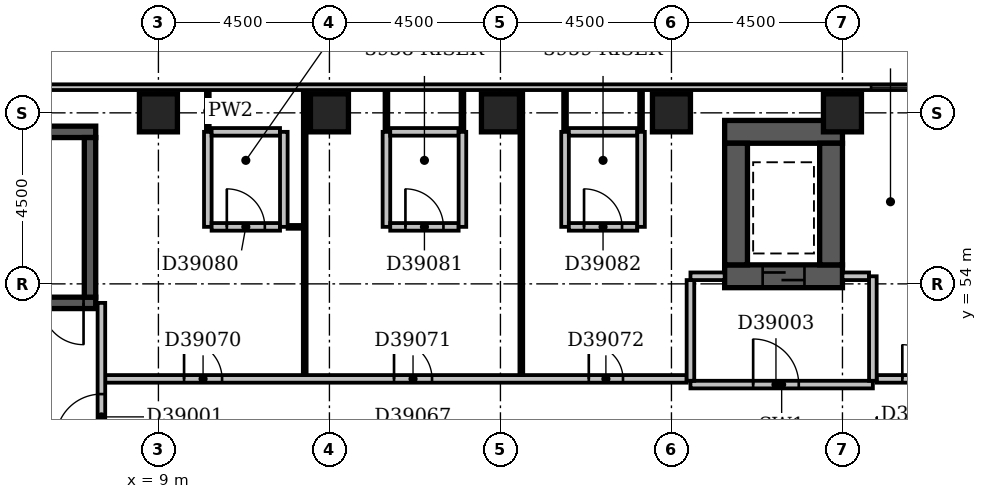
"""IFC4 building model, lengths in metres.
Left out: names, types, materials, properties, quantities, classifications, styles, units other than length and angle.
Written with IfcOpenShell. Run it as: python <this file> out.ifc"""

import sys

from ifc_helpers import new_model, si_unit, direction, frame, frame_2d, origin, origin_2d, place, context, subcontext, project, spatial, rectangle, extrude, element, fill, save


model = new_model("IFC4")
c1 = context("Model", 3, precision=1e-05, world=origin(), true_north=direction((0.0, 1.0)))
c2 = subcontext(c1, "Body", "Model", "MODEL_VIEW")
j1 = project(units=[si_unit("LENGTHUNIT", "METRE"), si_unit("PLANEANGLEUNIT", "RADIAN")], contexts=[c1])
p1 = place(None, origin())
s1 = spatial("IfcSite", under=j1, at=p1, CompositionType="ELEMENT")
p2 = place(p1, origin())
s2 = spatial("IfcBuilding", under=s1, at=p2, CompositionType="ELEMENT")
p3 = place(p2, frame((0.0, 0.0, 155.6)))
s3 = spatial("IfcBuildingStorey", under=s2, at=p3, CompositionType="ELEMENT", Elevation=155.6)
p4 = place(p3, frame((0.35, 53.5, -0.3), z_axis=(0.0, 0.0, 1.0), x_axis=(1.0, 0.0, 0.0)))
e1 = element("IfcWall", 1, at=p4, inside=s3, PredefinedType="SHEAR", context=c2, shape_type="SweptSolid", body=[
    extrude(rectangle(XDim=7.0, YDim=0.3, at=frame_2d((3.5, 0.0))), origin(), (0.0, 0.0, 1.0), 3.6),
])
p5 = place(p4, frame((5.58, 0.0, 0.3)))
e2 = element("IfcOpeningElement", 2, at=p5, cuts=e1, PredefinedType="OPENING", context=c2, shape_type="SweptSolid", body=[
    extrude(rectangle(XDim=1.1, YDim=2.1, at=frame_2d((0.55, 1.05))), frame((0.0, 0.162, 0.0), z_axis=(0.0, -1.0, 0.0), x_axis=(1.0, 0.0, 0.0)), (0.0, 0.0, 1.0), 0.324),
])
p6 = place(p3, frame((0.35, 58.0, -0.3), z_axis=(0.0, 0.0, 1.0), x_axis=(1.0, 0.0, 0.0)))
e3 = element("IfcWall", 3, at=p6, inside=s3, PredefinedType="SHEAR", context=c2, shape_type="SweptSolid", body=[
    extrude(rectangle(XDim=7.0, YDim=0.3, at=frame_2d((3.5, 0.0))), origin(), (0.0, 0.0, 1.0), 3.6),
])
p7 = place(p3, frame((7.2, 53.65, -0.3), z_axis=(0.0, 0.0, 1.0), x_axis=(0.0, 1.0, 0.0)))
e4 = element("IfcWall", 4, at=p7, inside=s3, PredefinedType="SHEAR", context=c2, shape_type="SweptSolid", body=[
    extrude(rectangle(XDim=4.2, YDim=0.3, at=frame_2d((2.1, 0.0))), origin(), (0.0, 0.0, 1.0), 3.6),
])
p8 = place(p3, frame((23.9, 54.2, -0.3), z_axis=(0.0, 0.0, 1.0), x_axis=(1.0, 0.0, 0.0)))
e5 = element("IfcWall", 5, at=p8, inside=s3, PredefinedType="SHEAR", context=c2, shape_type="SweptSolid", body=[
    extrude(rectangle(XDim=3.1, YDim=0.6, at=frame_2d((1.55, 0.0))), origin(), (0.0, 0.0, 1.0), 3.6),
])
p9 = place(p8, frame((1.0, 0.0, 0.3)))
e6 = element("IfcOpeningElement", 6, at=p9, cuts=e5, PredefinedType="OPENING", context=c2, shape_type="SweptSolid", body=[
    extrude(rectangle(XDim=1.1, YDim=2.1, at=frame_2d((0.55, 1.05))), frame((0.0, 0.312, 0.0), z_axis=(0.0, -1.0, 0.0), x_axis=(1.0, 0.0, 0.0)), (0.0, 0.0, 1.0), 0.624),
])
p10 = place(p3, frame((23.9, 58.0, -0.3), z_axis=(0.0, 0.0, 1.0), x_axis=(1.0, 0.0, 0.0)))
e7 = element("IfcWall", 7, at=p10, inside=s3, PredefinedType="SHEAR", context=c2, shape_type="SweptSolid", body=[
    extrude(rectangle(XDim=3.1, YDim=0.6, at=frame_2d((1.55, 0.0))), origin(), (0.0, 0.0, 1.0), 3.6),
])
for number, where, z_axis, x_axis in (
    (8, (24.2, 54.5, -0.3), (0.0, 0.0, 1.0), (0.0, 1.0, 0.0)),
    (9, (26.7, 54.5, -0.3), (0.0, 0.0, 1.0), (0.0, 1.0, 0.0)),
):
    element("IfcWall", number, at=place(p3, frame(where, z_axis=z_axis, x_axis=x_axis)), inside=s3, PredefinedType="SHEAR", context=c2, shape_type="SweptSolid", body=[
        extrude(rectangle(XDim=3.2, YDim=0.6, at=frame_2d((1.6, 0.0))), origin(), (0.0, 0.0, 1.0), 3.6),
    ])
for number, where, z_axis, x_axis in (
    (10, (9.0, 58.5, -0.3), (0.0, 0.0, 1.0), (1.0, 0.0, 0.0)),
    (11, (13.5, 58.5, -0.3), (0.0, 0.0, 1.0), (1.0, 0.0, 0.0)),
    (12, (18.0, 58.5, -0.3), (0.0, 0.0, 1.0), (1.0, 0.0, 0.0)),
    (13, (22.5, 58.5, -0.3), (0.0, 0.0, 1.0), (1.0, 0.0, 0.0)),
    (14, (27.0, 58.5, -0.3), (0.0, 0.0, 1.0), (1.0, 0.0, 0.0)),
):
    element("IfcColumn", number, at=place(p3, frame(where, z_axis=z_axis, x_axis=x_axis)), inside=s3, PredefinedType="COLUMN", context=c2, shape_type="SweptSolid", body=[
        extrude(rectangle(XDim=1.0, YDim=1.0, at=origin_2d()), origin(), (0.0, 0.0, 1.0), 3.6),
    ])
p11 = place(p3, frame((68.1, 59.175, 0.0), z_axis=(0.0, 0.0, 1.0), x_axis=(-1.0, 0.0, 0.0)))
e15 = element("IfcWall", 15, at=p11, inside=s3, PredefinedType="STANDARD", context=c2, shape_type="SweptSolid", body=[
    extrude(rectangle(XDim=68.85, YDim=0.15, at=frame_2d((34.425, 0.0))), origin(), (0.0, 0.0, 1.0), 2.7),
])
p12 = place(p11, frame((1.65, 0.0, 0.6)))
e16 = element("IfcOpeningElement", 16, at=p12, cuts=e15, PredefinedType="OPENING", context=c2, shape_type="SweptSolid", body=[
    extrude(rectangle(XDim=2.4, YDim=1.8, at=frame_2d((1.2, 0.9))), frame((0.0, 0.087, 0.0), z_axis=(0.0, -1.0, 0.0), x_axis=(1.0, 0.0, 0.0)), (0.0, 0.0, 1.0), 0.174),
])
p13 = place(p11, frame((6.15, 0.0, 0.6)))
e17 = element("IfcOpeningElement", 17, at=p13, cuts=e15, PredefinedType="OPENING", context=c2, shape_type="SweptSolid", body=[
    extrude(rectangle(XDim=2.4, YDim=1.8, at=frame_2d((1.2, 0.9))), frame((0.0, 0.087, 0.0), z_axis=(0.0, -1.0, 0.0), x_axis=(1.0, 0.0, 0.0)), (0.0, 0.0, 1.0), 0.174),
])
p14 = place(p11, frame((38.847, 0.0, 0.6)))
e18 = element("IfcOpeningElement", 18, at=p14, cuts=e15, PredefinedType="OPENING", context=c2, shape_type="SweptSolid", body=[
    extrude(rectangle(XDim=1.5, YDim=1.8, at=frame_2d((0.75, 0.9))), frame((0.0, 0.087, 0.0), z_axis=(0.0, -1.0, 0.0), x_axis=(1.0, 0.0, 0.0)), (0.0, 0.0, 1.0), 0.174),
])
p15 = place(p3, frame((23.0, 51.35, 0.0), z_axis=(0.0, 0.0, 1.0), x_axis=(1.0, 0.0, 0.0)))
e19 = element("IfcWall", 19, at=p15, inside=s3, PredefinedType="PARTITIONING", context=c2, shape_type="SweptSolid", body=[
    extrude(rectangle(XDim=4.8, YDim=0.2, at=frame_2d((2.4, 0.0))), origin(), (0.0, 0.0, 1.0), 3.3),
])
p16 = place(p15, frame((1.65, 0.0, 0.0)))
e20 = element("IfcOpeningElement", 20, at=p16, cuts=e19, PredefinedType="OPENING", context=c2, shape_type="SweptSolid", body=[
    extrude(rectangle(XDim=1.2, YDim=2.1, at=frame_2d((0.6, 1.05))), frame((0.0, 0.112, 0.0), z_axis=(0.0, -1.0, 0.0), x_axis=(1.0, 0.0, 0.0)), (0.0, 0.0, 1.0), 0.224),
])
p17 = place(p3, frame((27.8, 51.45, 0.0), z_axis=(0.0, 0.0, 1.0), x_axis=(0.0, 1.0, 0.0)))
e21 = element("IfcWall", 21, at=p17, inside=s3, PredefinedType="PARTITIONING", context=c2, shape_type="SweptSolid", body=[
    extrude(rectangle(XDim=2.75, YDim=0.2, at=frame_2d((1.375, 0.0))), origin(), (0.0, 0.0, 1.0), 3.3),
])
p18 = place(p3, frame((23.0, 54.2, 0.0), z_axis=(0.0, 0.0, 1.0), x_axis=(1.0, 0.0, 0.0)))
e22 = element("IfcWall", 22, at=p18, inside=s3, PredefinedType="PARTITIONING", context=c2, shape_type="SweptSolid", body=[
    extrude(rectangle(XDim=0.9, YDim=0.2, at=frame_2d((0.45, 0.0))), origin(), (0.0, 0.0, 1.0), 3.3),
])
p19 = place(p3, frame((27.0, 54.2, 0.0), z_axis=(0.0, 0.0, 1.0), x_axis=(1.0, 0.0, 0.0)))
e23 = element("IfcWall", 23, at=p19, inside=s3, PredefinedType="PARTITIONING", context=c2, shape_type="SweptSolid", body=[
    extrude(rectangle(XDim=0.7, YDim=0.2, at=frame_2d((0.35, 0.0))), origin(), (0.0, 0.0, 1.0), 3.3),
])
p20 = place(p3, frame((23.0, 51.45, 0.0), z_axis=(0.0, 0.0, 1.0), x_axis=(0.0, 1.0, 0.0)))
e24 = element("IfcWall", 24, at=p20, inside=s3, PredefinedType="PARTITIONING", context=c2, shape_type="SweptSolid", body=[
    extrude(rectangle(XDim=2.65, YDim=0.2, at=frame_2d((1.325, 0.0))), origin(), (0.0, 0.0, 1.0), 3.3),
])
p21 = place(p3, frame((7.5, 49.6, 0.0), z_axis=(0.0, 0.0, 1.0), x_axis=(0.0, 1.0, 0.0)))
e25 = element("IfcWall", 25, at=p21, inside=s3, PredefinedType="PARTITIONING", context=c2, shape_type="SweptSolid", body=[
    extrude(rectangle(XDim=3.9, YDim=0.2, at=frame_2d((1.95, 0.0))), origin(), (0.0, 0.0, 1.0), 3.3),
])
p22 = place(p21, frame((0.3, 0.0, 0.0)))
e26 = element("IfcOpeningElement", 26, at=p22, cuts=e25, PredefinedType="OPENING", context=c2, shape_type="SweptSolid", body=[
    extrude(rectangle(XDim=1.2, YDim=2.1, at=frame_2d((0.6, 1.05))), frame((0.0, 0.112, 0.0), z_axis=(0.0, -1.0, 0.0), x_axis=(1.0, 0.0, 0.0)), (0.0, 0.0, 1.0), 0.224),
])
p23 = place(p3, frame((7.6, 51.5, 0.0), z_axis=(0.0, 0.0, 1.0), x_axis=(1.0, 0.0, 0.0)))
e27 = element("IfcWall", 27, at=p23, inside=s3, PredefinedType="PARTITIONING", context=c2, shape_type="SweptSolid", body=[
    extrude(rectangle(XDim=15.3, YDim=0.2, at=frame_2d((7.65, 0.0))), origin(), (0.0, 0.0, 1.0), 3.3),
])
p24 = place(p23, frame((2.075, 0.0, 0.0)))
e28 = element("IfcOpeningElement", 28, at=p24, cuts=e27, PredefinedType="OPENING", context=c2, shape_type="SweptSolid", body=[
    extrude(rectangle(XDim=1.0, YDim=2.1, at=frame_2d((0.5, 1.05))), frame((0.0, 0.112, 0.0), z_axis=(0.0, -1.0, 0.0), x_axis=(1.0, 0.0, 0.0)), (0.0, 0.0, 1.0), 0.224),
])
p25 = place(p23, frame((7.6, 0.0, 0.0)))
e29 = element("IfcOpeningElement", 29, at=p25, cuts=e27, PredefinedType="OPENING", context=c2, shape_type="SweptSolid", body=[
    extrude(rectangle(XDim=1.0, YDim=2.1, at=frame_2d((0.5, 1.05))), frame((0.0, 0.112, 0.0), z_axis=(0.0, -1.0, 0.0), x_axis=(1.0, 0.0, 0.0)), (0.0, 0.0, 1.0), 0.224),
])
p26 = place(p23, frame((12.725, 0.0, 0.0)))
e30 = element("IfcOpeningElement", 30, at=p26, cuts=e27, PredefinedType="OPENING", context=c2, shape_type="SweptSolid", body=[
    extrude(rectangle(XDim=0.9, YDim=2.1, at=frame_2d((0.45, 1.05))), frame((0.0, 0.112, 0.0), z_axis=(0.0, -1.0, 0.0), x_axis=(1.0, 0.0, 0.0)), (0.0, 0.0, 1.0), 0.224),
])
p27 = place(p3, frame((27.9, 51.5, 0.0), z_axis=(0.0, 0.0, 1.0), x_axis=(1.0, 0.0, 0.0)))
e31 = element("IfcWall", 31, at=p27, inside=s3, PredefinedType="PARTITIONING", context=c2, shape_type="SweptSolid", body=[
    extrude(rectangle(XDim=9.3, YDim=0.2, at=frame_2d((4.65, 0.0))), origin(), (0.0, 0.0, 1.0), 3.3),
])
p28 = place(p27, frame((0.675, 0.0, 0.0)))
e32 = element("IfcOpeningElement", 32, at=p28, cuts=e31, PredefinedType="OPENING", context=c2, shape_type="SweptSolid", body=[
    extrude(rectangle(XDim=0.9, YDim=2.1, at=frame_2d((0.45, 1.05))), frame((0.0, 0.112, 0.0), z_axis=(0.0, -1.0, 0.0), x_axis=(1.0, 0.0, 0.0)), (0.0, 0.0, 1.0), 0.224),
])
p29 = place(p27, frame((3.6, 0.0, 0.0)))
e33 = element("IfcOpeningElement", 33, at=p29, cuts=e31, PredefinedType="OPENING", context=c2, shape_type="SweptSolid", body=[
    extrude(rectangle(XDim=1.0, YDim=2.1, at=frame_2d((0.5, 1.05))), frame((0.0, 0.112, 0.0), z_axis=(0.0, -1.0, 0.0), x_axis=(1.0, 0.0, 0.0)), (0.0, 0.0, 1.0), 0.224),
])
p30 = place(p27, frame((7.125, 0.0, 0.0)))
e34 = element("IfcOpeningElement", 34, at=p30, cuts=e31, PredefinedType="OPENING", context=c2, shape_type="SweptSolid", body=[
    extrude(rectangle(XDim=1.0, YDim=2.1, at=frame_2d((0.5, 1.05))), frame((0.0, 0.112, 0.0), z_axis=(0.0, -1.0, 0.0), x_axis=(1.0, 0.0, 0.0)), (0.0, 0.0, 1.0), 0.224),
])
for number, where, z_axis, x_axis in (
    (35, (12.85, 51.6, 0.0), (0.0, 0.0, 1.0), (0.0, 1.0, 0.0)),
    (36, (18.55, 51.6, 0.0), (0.0, 0.0, 1.0), (0.0, 1.0, 0.0)),
):
    element("IfcWall", number, at=place(p3, frame(where, z_axis=z_axis, x_axis=x_axis)), inside=s3, PredefinedType="PARTITIONING", context=c2, shape_type="SweptSolid", body=[
        extrude(rectangle(XDim=7.5, YDim=0.1, at=frame_2d((3.75, 0.0))), origin(), (0.0, 0.0, 1.0), 3.3),
    ])
p31 = place(p3, frame((10.3, 55.5, 0.0), z_axis=(0.0, 0.0, 1.0), x_axis=(0.0, 1.0, 0.0)))
e37 = element("IfcWall", 37, at=p31, inside=s3, PredefinedType="PARTITIONING", context=c2, shape_type="SweptSolid", body=[
    extrude(rectangle(XDim=2.5, YDim=0.2, at=frame_2d((1.25, 0.0))), origin(), (0.0, 0.0, 1.0), 3.3),
])
p32 = place(p3, frame((10.4, 55.5, 0.0), z_axis=(0.0, 0.0, 1.0), x_axis=(1.0, 0.0, 0.0)))
e38 = element("IfcWall", 38, at=p32, inside=s3, PredefinedType="PARTITIONING", context=c2, shape_type="SweptSolid", body=[
    extrude(rectangle(XDim=1.8, YDim=0.2, at=frame_2d((0.9, 0.0))), origin(), (0.0, 0.0, 1.0), 3.3),
])
p33 = place(p32, frame((0.4, 0.0, 0.0)))
e39 = element("IfcOpeningElement", 39, at=p33, cuts=e38, PredefinedType="OPENING", context=c2, shape_type="SweptSolid", body=[
    extrude(rectangle(XDim=1.0, YDim=2.1, at=frame_2d((0.5, 1.05))), frame((0.0, 0.112, 0.0), z_axis=(0.0, -1.0, 0.0), x_axis=(1.0, 0.0, 0.0)), (0.0, 0.0, 1.0), 0.224),
])
p34 = place(p3, frame((12.3, 55.5, 0.0), z_axis=(0.0, 0.0, 1.0), x_axis=(0.0, 1.0, 0.0)))
e40 = element("IfcWall", 40, at=p34, inside=s3, PredefinedType="PARTITIONING", context=c2, shape_type="SweptSolid", body=[
    extrude(rectangle(XDim=2.5, YDim=0.2, at=frame_2d((1.25, 0.0))), origin(), (0.0, 0.0, 1.0), 3.3),
])
p35 = place(p3, frame((12.4, 55.5, 0.0), z_axis=(0.0, 0.0, 1.0), x_axis=(1.0, 0.0, 0.0)))
e41 = element("IfcWall", 41, at=p35, inside=s3, PredefinedType="PARTITIONING", context=c2, shape_type="SweptSolid", body=[
    extrude(rectangle(XDim=0.4, YDim=0.1, at=frame_2d((0.2, 0.0))), origin(), (0.0, 0.0, 1.0), 3.3),
])
p36 = place(p3, frame((15.0, 55.5, 0.0), z_axis=(0.0, 0.0, 1.0), x_axis=(0.0, 1.0, 0.0)))
e42 = element("IfcWall", 42, at=p36, inside=s3, PredefinedType="PARTITIONING", context=c2, shape_type="SweptSolid", body=[
    extrude(rectangle(XDim=2.5, YDim=0.2, at=frame_2d((1.25, 0.0))), origin(), (0.0, 0.0, 1.0), 3.3),
])
p37 = place(p3, frame((15.1, 55.5, 0.0), z_axis=(0.0, 0.0, 1.0), x_axis=(1.0, 0.0, 0.0)))
e43 = element("IfcWall", 43, at=p37, inside=s3, PredefinedType="PARTITIONING", context=c2, shape_type="SweptSolid", body=[
    extrude(rectangle(XDim=1.8, YDim=0.2, at=frame_2d((0.9, 0.0))), origin(), (0.0, 0.0, 1.0), 3.3),
])
p38 = place(p37, frame((0.4, 0.0, 0.0)))
e44 = element("IfcOpeningElement", 44, at=p38, cuts=e43, PredefinedType="OPENING", context=c2, shape_type="SweptSolid", body=[
    extrude(rectangle(XDim=1.0, YDim=2.1, at=frame_2d((0.5, 1.05))), frame((0.0, 0.112, 0.0), z_axis=(0.0, -1.0, 0.0), x_axis=(1.0, 0.0, 0.0)), (0.0, 0.0, 1.0), 0.224),
])
for number, where, z_axis, x_axis in (
    (45, (17.0, 55.5, 0.0), (0.0, 0.0, 1.0), (0.0, 1.0, 0.0)),
    (46, (19.7, 55.5, 0.0), (0.0, 0.0, 1.0), (0.0, 1.0, 0.0)),
):
    element("IfcWall", number, at=place(p3, frame(where, z_axis=z_axis, x_axis=x_axis)), inside=s3, PredefinedType="PARTITIONING", context=c2, shape_type="SweptSolid", body=[
        extrude(rectangle(XDim=2.5, YDim=0.2, at=frame_2d((1.25, 0.0))), origin(), (0.0, 0.0, 1.0), 3.3),
    ])
p39 = place(p3, frame((19.8, 55.5, 0.0), z_axis=(0.0, 0.0, 1.0), x_axis=(1.0, 0.0, 0.0)))
e47 = element("IfcWall", 47, at=p39, inside=s3, PredefinedType="PARTITIONING", context=c2, shape_type="SweptSolid", body=[
    extrude(rectangle(XDim=1.8, YDim=0.2, at=frame_2d((0.9, 0.0))), origin(), (0.0, 0.0, 1.0), 3.3),
])
p40 = place(p39, frame((0.4, 0.0, 0.0)))
e48 = element("IfcOpeningElement", 48, at=p40, cuts=e47, PredefinedType="OPENING", context=c2, shape_type="SweptSolid", body=[
    extrude(rectangle(XDim=1.0, YDim=2.1, at=frame_2d((0.5, 1.05))), frame((0.0, 0.112, 0.0), z_axis=(0.0, -1.0, 0.0), x_axis=(1.0, 0.0, 0.0)), (0.0, 0.0, 1.0), 0.224),
])
p41 = place(p3, frame((21.7, 55.5, 0.0), z_axis=(0.0, 0.0, 1.0), x_axis=(0.0, 1.0, 0.0)))
e49 = element("IfcWall", 49, at=p41, inside=s3, PredefinedType="PARTITIONING", context=c2, shape_type="SweptSolid", body=[
    extrude(rectangle(XDim=2.5, YDim=0.2, at=frame_2d((1.25, 0.0))), origin(), (0.0, 0.0, 1.0), 3.3),
])
p42 = place(p3, frame((10.3, 58.0, 0.0), z_axis=(0.0, 0.0, 1.0), x_axis=(0.0, 1.0, 0.0)))
e50 = element("IfcWall", 50, at=p42, inside=s3, PredefinedType="PARTITIONING", context=c2, shape_type="SweptSolid", body=[
    extrude(rectangle(XDim=1.1, YDim=0.1, at=frame_2d((0.55, 0.0))), origin(), (0.0, 0.0, 1.0), 3.3),
])
p43 = place(p3, frame((10.4, 58.0, 0.0), z_axis=(0.0, 0.0, 1.0), x_axis=(1.0, 0.0, 0.0)))
e51 = element("IfcWall", 51, at=p43, inside=s3, PredefinedType="PARTITIONING", context=c2, shape_type="SweptSolid", body=[
    extrude(rectangle(XDim=1.8, YDim=0.2, at=frame_2d((0.9, 0.0))), origin(), (0.0, 0.0, 1.0), 3.3),
])
p44 = place(p3, frame((15.0, 58.0, 0.0), z_axis=(0.0, 0.0, 1.0), x_axis=(0.0, 1.0, 0.0)))
e52 = element("IfcWall", 52, at=p44, inside=s3, PredefinedType="PARTITIONING", context=c2, shape_type="SweptSolid", body=[
    extrude(rectangle(XDim=1.1, YDim=0.1, at=frame_2d((0.55, 0.0))), origin(), (0.0, 0.0, 1.0), 3.3),
])
p45 = place(p3, frame((15.1, 58.0, 0.0), z_axis=(0.0, 0.0, 1.0), x_axis=(1.0, 0.0, 0.0)))
e53 = element("IfcWall", 53, at=p45, inside=s3, PredefinedType="PARTITIONING", context=c2, shape_type="SweptSolid", body=[
    extrude(rectangle(XDim=1.8, YDim=0.2, at=frame_2d((0.9, 0.0))), origin(), (0.0, 0.0, 1.0), 3.3),
])
for number, where, z_axis, x_axis in (
    (54, (17.0, 58.0, 0.0), (0.0, 0.0, 1.0), (0.0, 1.0, 0.0)),
    (55, (19.7, 58.0, 0.0), (0.0, 0.0, 1.0), (0.0, 1.0, 0.0)),
):
    element("IfcWall", number, at=place(p3, frame(where, z_axis=z_axis, x_axis=x_axis)), inside=s3, PredefinedType="PARTITIONING", context=c2, shape_type="SweptSolid", body=[
        extrude(rectangle(XDim=1.1, YDim=0.1, at=frame_2d((0.55, 0.0))), origin(), (0.0, 0.0, 1.0), 3.3),
    ])
p46 = place(p3, frame((19.8, 58.0, 0.0), z_axis=(0.0, 0.0, 1.0), x_axis=(1.0, 0.0, 0.0)))
e56 = element("IfcWall", 56, at=p46, inside=s3, PredefinedType="PARTITIONING", context=c2, shape_type="SweptSolid", body=[
    extrude(rectangle(XDim=1.8, YDim=0.2, at=frame_2d((0.9, 0.0))), origin(), (0.0, 0.0, 1.0), 3.3),
])
p47 = place(p3, frame((21.7, 58.0, 0.0), z_axis=(0.0, 0.0, 1.0), x_axis=(0.0, 1.0, 0.0)))
e57 = element("IfcWall", 57, at=p47, inside=s3, PredefinedType="PARTITIONING", context=c2, shape_type="SweptSolid", body=[
    extrude(rectangle(XDim=1.1, YDim=0.1, at=frame_2d((0.55, 0.0))), origin(), (0.0, 0.0, 1.0), 3.3),
])
p48 = place(p14, origin())
e58 = element("IfcWindow", 58, at=p48, inside=s3, PartitioningType="SINGLE_PANEL", PredefinedType="WINDOW", context=c2, shape_type="SweptSolid", body=[
    extrude(rectangle(XDim=1.5, YDim=1.8, at=frame_2d((0.75, 0.9))), frame((0.0, 0.03, 0.0), z_axis=(0.0, -1.0, 0.0), x_axis=(1.0, 0.0, 0.0)), (0.0, 0.0, 1.0), 0.06),
])
fill(e18, e58)
p49 = place(p22, origin())
e59 = element("IfcDoor", 59, at=p49, inside=s3, OperationType="SINGLE_SWING_LEFT", PredefinedType="DOOR", context=c2, shape_type="SweptSolid", body=[
    extrude(rectangle(XDim=1.2, YDim=2.1, at=frame_2d((0.6, 1.05))), frame((0.0, 0.025, 0.0), z_axis=(0.0, -1.0, 0.0), x_axis=(1.0, 0.0, 0.0)), (0.0, 0.0, 1.0), 0.05),
])
fill(e26, e59)
p50 = place(p16, origin())
e60 = element("IfcDoor", 60, at=p50, inside=s3, OperationType="SINGLE_SWING_LEFT", PredefinedType="DOOR", context=c2, shape_type="SweptSolid", body=[
    extrude(rectangle(XDim=1.2, YDim=2.1, at=frame_2d((0.6, 1.05))), frame((0.0, 0.025, 0.0), z_axis=(0.0, -1.0, 0.0), x_axis=(1.0, 0.0, 0.0)), (0.0, 0.0, 1.0), 0.05),
])
fill(e20, e60)
p51 = place(p9, origin())
e61 = element("IfcDoor", 61, at=p51, inside=s3, OperationType="SLIDING_TO_LEFT", PredefinedType="DOOR", context=c2, shape_type="SweptSolid", body=[
    extrude(rectangle(XDim=1.1, YDim=2.1, at=frame_2d((0.55, 1.05))), frame((0.0, 0.025, 0.0), z_axis=(0.0, -1.0, 0.0), x_axis=(1.0, 0.0, 0.0)), (0.0, 0.0, 1.0), 0.05),
])
fill(e6, e61)
p52 = place(p5, origin())
e62 = element("IfcDoor", 62, at=p52, inside=s3, OperationType="SINGLE_SWING_RIGHT", PredefinedType="DOOR", context=c2, shape_type="SweptSolid", body=[
    extrude(rectangle(XDim=1.1, YDim=2.1, at=frame_2d((0.55, 1.05))), frame((0.0, 0.025, 0.0), z_axis=(0.0, -1.0, 0.0), x_axis=(1.0, 0.0, 0.0)), (0.0, 0.0, 1.0), 0.05),
])
fill(e2, e62)
p53 = place(p24, origin())
e63 = element("IfcDoor", 63, at=p53, inside=s3, OperationType="SINGLE_SWING_LEFT", PredefinedType="DOOR", context=c2, shape_type="SweptSolid", body=[
    extrude(rectangle(XDim=1.0, YDim=2.1, at=frame_2d((0.5, 1.05))), frame((0.0, 0.025, 0.0), z_axis=(0.0, -1.0, 0.0), x_axis=(1.0, 0.0, 0.0)), (0.0, 0.0, 1.0), 0.05),
])
fill(e28, e63)
p54 = place(p25, origin())
e64 = element("IfcDoor", 64, at=p54, inside=s3, OperationType="SINGLE_SWING_LEFT", PredefinedType="DOOR", context=c2, shape_type="SweptSolid", body=[
    extrude(rectangle(XDim=1.0, YDim=2.1, at=frame_2d((0.5, 1.05))), frame((0.0, 0.025, 0.0), z_axis=(0.0, -1.0, 0.0), x_axis=(1.0, 0.0, 0.0)), (0.0, 0.0, 1.0), 0.05),
])
fill(e29, e64)
p55 = place(p26, origin())
e65 = element("IfcDoor", 65, at=p55, inside=s3, OperationType="SINGLE_SWING_LEFT", PredefinedType="DOOR", context=c2, shape_type="SweptSolid", body=[
    extrude(rectangle(XDim=0.9, YDim=2.1, at=frame_2d((0.45, 1.05))), frame((0.0, 0.025, 0.0), z_axis=(0.0, -1.0, 0.0), x_axis=(1.0, 0.0, 0.0)), (0.0, 0.0, 1.0), 0.05),
])
fill(e30, e65)
p56 = place(p28, origin())
e66 = element("IfcDoor", 66, at=p56, inside=s3, OperationType="SINGLE_SWING_LEFT", PredefinedType="DOOR", context=c2, shape_type="SweptSolid", body=[
    extrude(rectangle(XDim=0.9, YDim=2.1, at=frame_2d((0.45, 1.05))), frame((0.0, 0.025, 0.0), z_axis=(0.0, -1.0, 0.0), x_axis=(1.0, 0.0, 0.0)), (0.0, 0.0, 1.0), 0.05),
])
fill(e32, e66)
p57 = place(p33, origin())
e67 = element("IfcDoor", 67, at=p57, inside=s3, OperationType="SINGLE_SWING_LEFT", PredefinedType="DOOR", context=c2, shape_type="SweptSolid", body=[
    extrude(rectangle(XDim=1.0, YDim=2.1, at=frame_2d((0.5, 1.05))), frame((0.0, 0.025, 0.0), z_axis=(0.0, -1.0, 0.0), x_axis=(1.0, 0.0, 0.0)), (0.0, 0.0, 1.0), 0.05),
])
fill(e39, e67)
p58 = place(p38, origin())
e68 = element("IfcDoor", 68, at=p58, inside=s3, OperationType="SINGLE_SWING_LEFT", PredefinedType="DOOR", context=c2, shape_type="SweptSolid", body=[
    extrude(rectangle(XDim=1.0, YDim=2.1, at=frame_2d((0.5, 1.05))), frame((0.0, 0.025, 0.0), z_axis=(0.0, -1.0, 0.0), x_axis=(1.0, 0.0, 0.0)), (0.0, 0.0, 1.0), 0.05),
])
fill(e44, e68)
p59 = place(p40, origin())
e69 = element("IfcDoor", 69, at=p59, inside=s3, OperationType="SINGLE_SWING_LEFT", PredefinedType="DOOR", context=c2, shape_type="SweptSolid", body=[
    extrude(rectangle(XDim=1.0, YDim=2.1, at=frame_2d((0.5, 1.05))), frame((0.0, 0.025, 0.0), z_axis=(0.0, -1.0, 0.0), x_axis=(1.0, 0.0, 0.0)), (0.0, 0.0, 1.0), 0.05),
])
fill(e48, e69)
save(model, sys.argv[1])
